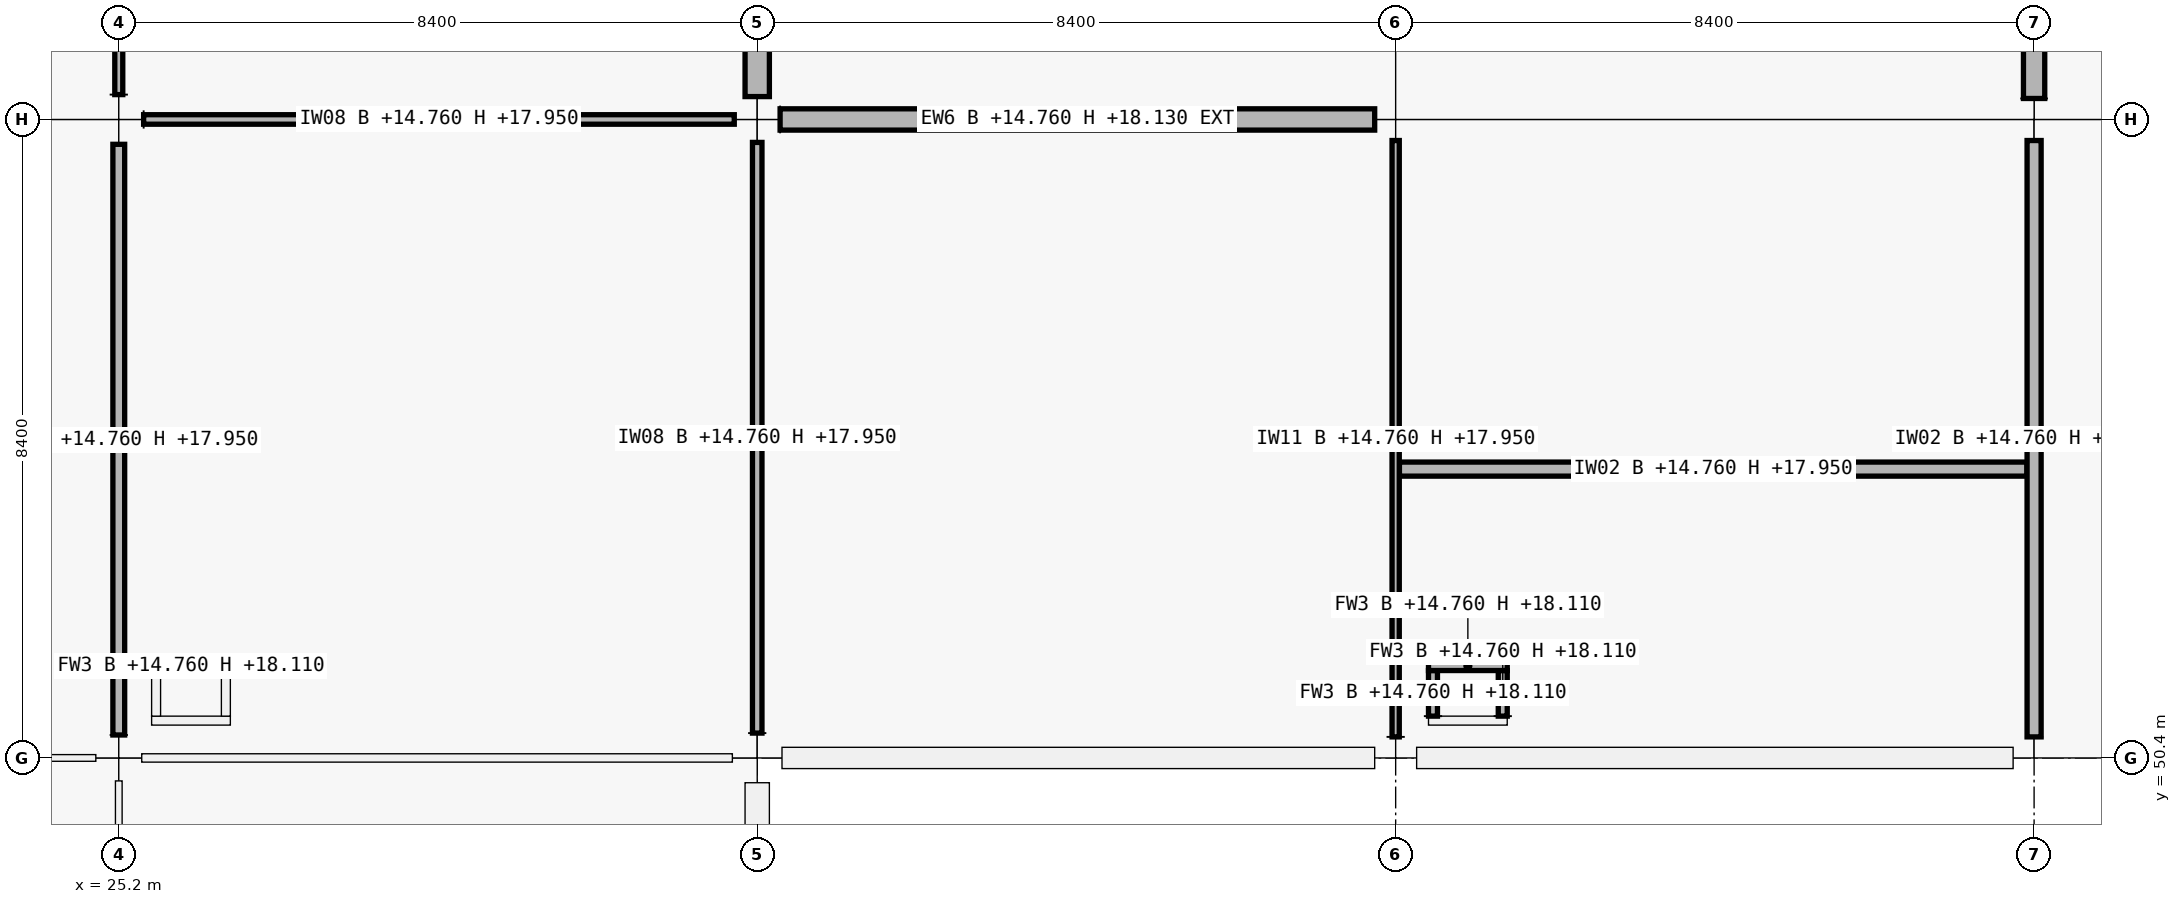
"""IFC4 building model, lengths in metres.
Left out: names, types, materials, properties, quantities, classifications, styles, units other than length and angle.
Written with IfcOpenShell. Run it as: python <this file> out.ifc"""

import sys

from ifc_helpers import new_model, si_unit, direction, frame, frame_2d, origin, origin_2d, place, context, subcontext, project, spatial, rectangle, extrude, element, fill, save


model = new_model("IFC4")
c1 = context("Model", 3, precision=1e-05, world=origin(), true_north=direction((0.0, 1.0)))
c2 = subcontext(c1, "Body", "Model", "MODEL_VIEW")
j1 = project(units=[si_unit("LENGTHUNIT", "METRE"), si_unit("PLANEANGLEUNIT", "RADIAN")], contexts=[c1])
p1 = place(None, origin())
s1 = spatial("IfcSite", under=j1, at=p1, CompositionType="ELEMENT")
p2 = place(p1, origin())
s2 = spatial("IfcBuilding", under=s1, at=p2, CompositionType="ELEMENT")
p3 = place(p2, frame((0.0, 0.0, 14.76)))
s3 = spatial("IfcBuildingStorey", under=s2, at=p3, CompositionType="ELEMENT", Elevation=14.76)
p4 = place(p3, frame((25.2, 50.4, 0.0), z_axis=(0.0, 0.0, 1.0), x_axis=(1.0, 0.0, 0.0)))
e1 = element("IfcColumn", 1, at=p4, inside=s3, PredefinedType="COLUMN", context=c2, shape_type="SweptSolid", body=[
    extrude(rectangle(XDim=0.6, YDim=0.6, at=origin_2d()), origin(), (0.0, 0.0, 1.0), 4.32),
])
for number, where, z_axis, x_axis in (
    (2, (25.2, 58.8, 0.0), (0.0, 0.0, 1.0), (1.0, 0.0, 0.0)),
    (3, (33.6, 50.4, 0.0), (0.0, 0.0, 1.0), (1.0, 0.0, 0.0)),
):
    element("IfcColumn", number, at=place(p3, frame(where, z_axis=z_axis, x_axis=x_axis)), inside=s3, PredefinedType="COLUMN", context=c2, shape_type="SweptSolid", body=[
        extrude(rectangle(XDim=0.65, YDim=0.65, at=origin_2d()), origin(), (0.0, 0.0, 1.0), 4.32),
    ])
p5 = place(p3, frame((33.6, 58.8, 0.0), z_axis=(0.0, 0.0, 1.0), x_axis=(1.0, 0.0, 0.0)))
e4 = element("IfcColumn", 4, at=p5, inside=s3, PredefinedType="COLUMN", context=c2, shape_type="SweptSolid", body=[
    extrude(rectangle(XDim=0.6, YDim=0.6, at=origin_2d()), origin(), (0.0, 0.0, 1.0), 4.32),
])
for number, where, z_axis, x_axis in (
    (5, (42.0, 50.4, 0.0), (0.0, 0.0, 1.0), (1.0, 0.0, 0.0)),
    (6, (42.0, 58.8, 0.0), (0.0, 0.0, 1.0), (1.0, 0.0, 0.0)),
    (7, (50.4, 50.4, 0.0), (0.0, 0.0, 1.0), (1.0, 0.0, 0.0)),
    (8, (50.4, 58.8, 0.0), (0.0, 0.0, 1.0), (1.0, 0.0, 0.0)),
):
    element("IfcColumn", number, at=place(p3, frame(where, z_axis=z_axis, x_axis=x_axis)), inside=s3, PredefinedType="COLUMN", context=c2, shape_type="SweptSolid", body=[
        extrude(rectangle(XDim=0.55, YDim=0.55, at=origin_2d()), origin(), (0.0, 0.0, 1.0), 4.07),
    ])
p6 = place(p3, frame((33.6, 50.074, 0.0), z_axis=(0.0, 0.0, 1.0), x_axis=(0.0, -1.0, 0.0)))
e9 = element("IfcWall", 9, at=p6, inside=s3, PredefinedType="SOLIDWALL", context=c2, shape_type="SweptSolid", body=[
    extrude(rectangle(XDim=7.773, YDim=0.32, at=frame_2d((3.886, 0.0))), origin(), (0.0, 0.0, 1.0), 3.37),
])
p7 = place(p6, frame((3.186, 0.0, 0.9)))
e10 = element("IfcOpeningElement", 10, at=p7, cuts=e9, PredefinedType="OPENING", context=c2, shape_type="SweptSolid", body=[
    extrude(rectangle(XDim=1.4, YDim=1.75, at=frame_2d((0.7, 0.875))), frame((0.0, 0.16, 0.0), z_axis=(0.0, -1.0, 0.0), x_axis=(1.0, 0.0, 0.0)), (0.0, 0.0, 1.0), 0.32),
])
p8 = place(p3, frame((33.6, 66.874, 0.0), z_axis=(0.0, 0.0, 1.0), x_axis=(0.0, -1.0, 0.0)))
e11 = element("IfcWall", 11, at=p8, inside=s3, PredefinedType="SOLIDWALL", context=c2, shape_type="SweptSolid", body=[
    extrude(rectangle(XDim=7.773, YDim=0.32, at=frame_2d((3.886, 0.0))), origin(), (0.0, 0.0, 1.0), 3.37),
])
p9 = place(p8, frame((2.286, 0.0, 0.9)))
e12 = element("IfcOpeningElement", 12, at=p9, cuts=e11, PredefinedType="OPENING", context=c2, shape_type="SweptSolid", body=[
    extrude(rectangle(XDim=3.2, YDim=1.75, at=frame_2d((1.6, 0.875))), frame((0.0, 0.16, 0.0), z_axis=(0.0, -1.0, 0.0), x_axis=(1.0, 0.0, 0.0)), (0.0, 0.0, 1.0), 0.32),
])
p10 = place(p3, frame((41.724, 50.4, 0.0), z_axis=(0.0, 0.0, 1.0), x_axis=(-1.0, 0.0, 0.0)))
e13 = element("IfcWall", 13, at=p10, inside=s3, PredefinedType="SOLIDWALL", context=c2, shape_type="SweptSolid", body=[
    extrude(rectangle(XDim=7.798, YDim=0.28, at=frame_2d((3.899, 0.0))), origin(), (0.0, 0.0, 1.0), 3.37),
])
p11 = place(p3, frame((33.901, 58.8, 0.0), z_axis=(0.0, 0.0, 1.0), x_axis=(1.0, 0.0, 0.0)))
e14 = element("IfcWall", 14, at=p11, inside=s3, PredefinedType="SOLIDWALL", context=c2, shape_type="SweptSolid", body=[
    extrude(rectangle(XDim=7.823, YDim=0.28, at=frame_2d((3.912, 0.0))), origin(), (0.0, 0.0, 1.0), 3.37),
])
p12 = place(p3, frame((50.124, 50.4, 0.0), z_axis=(0.0, 0.0, 1.0), x_axis=(-1.0, 0.0, 0.0)))
e15 = element("IfcWall", 15, at=p12, inside=s3, PredefinedType="SOLIDWALL", context=c2, shape_type="SweptSolid", body=[
    extrude(rectangle(XDim=7.848, YDim=0.28, at=frame_2d((3.924, 0.0))), origin(), (0.0, 0.0, 1.0), 3.37),
])
p13 = place(p12, frame((3.374, 0.0, 0.9)))
e16 = element("IfcOpeningElement", 16, at=p13, cuts=e15, PredefinedType="OPENING", context=c2, shape_type="SweptSolid", body=[
    extrude(rectangle(XDim=1.1, YDim=1.5, at=frame_2d((0.55, 0.75))), frame((0.0, 0.14, 0.0), z_axis=(0.0, -1.0, 0.0), x_axis=(1.0, 0.0, 0.0)), (0.0, 0.0, 1.0), 0.28),
])
p14 = place(p3, frame((50.4, 59.076, 0.0), z_axis=(0.0, 0.0, 1.0), x_axis=(0.0, 1.0, 0.0)))
e17 = element("IfcWall", 17, at=p14, inside=s3, PredefinedType="SOLIDWALL", context=c2, shape_type="SweptSolid", body=[
    extrude(rectangle(XDim=7.798, YDim=0.28, at=frame_2d((3.899, 0.0))), origin(), (0.0, 0.0, 1.0), 3.37),
])
p15 = place(p14, frame((3.149, 0.0, 0.9)))
e18 = element("IfcOpeningElement", 18, at=p15, cuts=e17, PredefinedType="OPENING", context=c2, shape_type="SweptSolid", body=[
    extrude(rectangle(XDim=1.5, YDim=1.2, at=frame_2d((0.75, 0.6))), frame((0.0, 0.14, 0.0), z_axis=(0.0, -1.0, 0.0), x_axis=(1.0, 0.0, 0.0)), (0.0, 0.0, 1.0), 0.28),
])
for number, where, z_axis, x_axis in (
    (19, (25.632, 50.891, 0.0), (0.0, 0.0, 1.0), (1.0, 0.0, 0.0)),
    (20, (25.632, 51.609, 0.0), (0.0, 0.0, 1.0), (1.0, 0.0, 0.0)),
):
    element("IfcWall", number, at=place(p3, frame(where, z_axis=z_axis, x_axis=x_axis)), inside=s3, PredefinedType="PARTITIONING", context=c2, shape_type="SweptSolid", body=[
        extrude(rectangle(XDim=1.036, YDim=0.118, at=frame_2d((0.518, 0.0))), origin(), (0.0, 0.0, 1.0), 3.35),
    ])
for number, where, z_axis, x_axis in (
    (21, (25.691, 50.95, 0.0), (0.0, 0.0, 1.0), (0.0, 1.0, 0.0)),
    (22, (26.609, 50.95, 0.0), (0.0, 0.0, 1.0), (0.0, 1.0, 0.0)),
):
    element("IfcWall", number, at=place(p3, frame(where, z_axis=z_axis, x_axis=x_axis)), inside=s3, PredefinedType="PARTITIONING", context=c2, shape_type="SweptSolid", body=[
        extrude(rectangle(XDim=0.6, YDim=0.118, at=frame_2d((0.3, 0.0))), origin(), (0.0, 0.0, 1.0), 3.35),
    ])
for number, where, z_axis, x_axis in (
    (23, (42.432, 50.891, 0.0), (0.0, 0.0, 1.0), (1.0, 0.0, 0.0)),
    (24, (42.432, 51.609, 0.0), (0.0, 0.0, 1.0), (1.0, 0.0, 0.0)),
):
    element("IfcWall", number, at=place(p3, frame(where, z_axis=z_axis, x_axis=x_axis)), inside=s3, PredefinedType="PARTITIONING", context=c2, shape_type="SweptSolid", body=[
        extrude(rectangle(XDim=1.036, YDim=0.118, at=frame_2d((0.518, 0.0))), origin(), (0.0, 0.0, 1.0), 3.35),
    ])
for number, where, z_axis, x_axis in (
    (25, (42.491, 50.95, 0.0), (0.0, 0.0, 1.0), (0.0, 1.0, 0.0)),
    (26, (43.409, 50.95, 0.0), (0.0, 0.0, 1.0), (0.0, 1.0, 0.0)),
):
    element("IfcWall", number, at=place(p3, frame(where, z_axis=z_axis, x_axis=x_axis)), inside=s3, PredefinedType="PARTITIONING", context=c2, shape_type="SweptSolid", body=[
        extrude(rectangle(XDim=0.6, YDim=0.118, at=frame_2d((0.3, 0.0))), origin(), (0.0, 0.0, 1.0), 3.35),
    ])
p16 = place(p3, frame((17.127, 50.4, 0.0), z_axis=(0.0, 0.0, 1.0), x_axis=(1.0, 0.0, 0.0)))
e27 = element("IfcWall", 27, at=p16, inside=s3, PredefinedType="PARTITIONING", context=c2, shape_type="SweptSolid", body=[
    extrude(rectangle(XDim=7.771, YDim=0.088, at=frame_2d((3.885, 0.0))), origin(), (0.0, 0.0, 1.0), 3.19),
])
p17 = place(p16, frame((0.658, 0.0, 0.0)))
e28 = element("IfcOpeningElement", 28, at=p17, cuts=e27, PredefinedType="OPENING", context=c2, shape_type="SweptSolid", body=[
    extrude(rectangle(XDim=0.96, YDim=2.1, at=frame_2d((0.48, 1.05))), frame((0.0, 0.044, 0.0), z_axis=(0.0, -1.0, 0.0), x_axis=(1.0, 0.0, 0.0)), (0.0, 0.0, 1.0), 0.088),
])
p18 = place(p16, frame((4.598, 0.0, 0.0)))
e29 = element("IfcOpeningElement", 29, at=p18, cuts=e27, PredefinedType="OPENING", context=c2, shape_type="SweptSolid", body=[
    extrude(rectangle(XDim=0.92, YDim=2.1, at=frame_2d((0.46, 1.05))), frame((0.0, 0.044, 0.0), z_axis=(0.0, -1.0, 0.0), x_axis=(1.0, 0.0, 0.0)), (0.0, 0.0, 1.0), 0.088),
])
p19 = place(p3, frame((25.502, 50.4, 0.0), z_axis=(0.0, 0.0, 1.0), x_axis=(1.0, 0.0, 0.0)))
e30 = element("IfcWall", 30, at=p19, inside=s3, PredefinedType="MOVABLE", context=c2, shape_type="SweptSolid", body=[
    extrude(rectangle(XDim=7.771, YDim=0.11, at=frame_2d((3.885, 0.0))), origin(), (0.0, 0.0, 1.0), 3.19),
])
p20 = place(p19, frame((3.381, 0.0, 0.0)))
e31 = element("IfcOpeningElement", 31, at=p20, cuts=e30, PredefinedType="OPENING", context=c2, shape_type="SweptSolid", body=[
    extrude(rectangle(XDim=1.01, YDim=2.12, at=frame_2d((0.505, 1.06))), frame((0.0, 0.055, 0.0), z_axis=(0.0, -1.0, 0.0), x_axis=(1.0, 0.0, 0.0)), (0.0, 0.0, 1.0), 0.11),
])
p21 = place(p3, frame((25.527, 58.8, 0.0), z_axis=(0.0, 0.0, 1.0), x_axis=(1.0, 0.0, 0.0)))
e32 = element("IfcWall", 32, at=p21, inside=s3, PredefinedType="PARTITIONING", context=c2, shape_type="SweptSolid", body=[
    extrude(rectangle(XDim=7.771, YDim=0.125, at=frame_2d((3.885, 0.0))), origin(), (0.0, 0.0, 1.0), 3.19),
])
p22 = place(p21, frame((3.401, 0.0, 0.0)))
e33 = element("IfcOpeningElement", 33, at=p22, cuts=e32, PredefinedType="OPENING", context=c2, shape_type="SweptSolid", body=[
    extrude(rectangle(XDim=0.97, YDim=2.12, at=frame_2d((0.485, 1.06))), frame((0.0, 0.062, 0.0), z_axis=(0.0, -1.0, 0.0), x_axis=(1.0, 0.0, 0.0)), (0.0, 0.0, 1.0), 0.125),
])
p23 = place(p3, frame((25.2, 42.327, 0.0), z_axis=(0.0, 0.0, 1.0), x_axis=(0.0, 1.0, 0.0)))
e34 = element("IfcWall", 34, at=p23, inside=s3, PredefinedType="PARTITIONING", context=c2, shape_type="SweptSolid", body=[
    extrude(rectangle(XDim=7.771, YDim=0.088, at=frame_2d((3.885, 0.0))), origin(), (0.0, 0.0, 1.0), 3.19),
])
p24 = place(p3, frame((25.2, 50.702, 0.0), z_axis=(0.0, 0.0, 1.0), x_axis=(0.0, 1.0, 0.0)))
e35 = element("IfcWall", 35, at=p24, inside=s3, PredefinedType="PARTITIONING", context=c2, shape_type="SweptSolid", body=[
    extrude(rectangle(XDim=7.771, YDim=0.155, at=frame_2d((3.885, 0.0))), origin(), (0.0, 0.0, 1.0), 3.19),
])
p25 = place(p24, frame((3.385, 0.0, 0.0)))
e36 = element("IfcOpeningElement", 36, at=p25, cuts=e35, PredefinedType="OPENING", context=c2, shape_type="SweptSolid", body=[
    extrude(rectangle(XDim=1.0, YDim=2.2, at=frame_2d((0.5, 1.1))), frame((0.0, 0.078, 0.0), z_axis=(0.0, -1.0, 0.0), x_axis=(1.0, 0.0, 0.0)), (0.0, 0.0, 1.0), 0.155),
])
p26 = place(p3, frame((25.2, 59.127, 0.0), z_axis=(0.0, 0.0, 1.0), x_axis=(0.0, 1.0, 0.0)))
e37 = element("IfcWall", 37, at=p26, inside=s3, PredefinedType="PARTITIONING", context=c2, shape_type="SweptSolid", body=[
    extrude(rectangle(XDim=7.771, YDim=0.105, at=frame_2d((3.885, 0.0))), origin(), (0.0, 0.0, 1.0), 3.19),
])
p27 = place(p26, frame((3.396, 0.0, 0.0)))
e38 = element("IfcOpeningElement", 38, at=p27, cuts=e37, PredefinedType="OPENING", context=c2, shape_type="SweptSolid", body=[
    extrude(rectangle(XDim=0.98, YDim=2.18, at=frame_2d((0.49, 1.09))), frame((0.0, 0.052, 0.0), z_axis=(0.0, -1.0, 0.0), x_axis=(1.0, 0.0, 0.0)), (0.0, 0.0, 1.0), 0.105),
])
p28 = place(p3, frame((33.6, 50.727, 0.0), z_axis=(0.0, 0.0, 1.0), x_axis=(0.0, 1.0, 0.0)))
e39 = element("IfcWall", 39, at=p28, inside=s3, PredefinedType="PARTITIONING", context=c2, shape_type="SweptSolid", body=[
    extrude(rectangle(XDim=7.771, YDim=0.125, at=frame_2d((3.885, 0.0))), origin(), (0.0, 0.0, 1.0), 3.19),
])
p29 = place(p28, frame((3.365, 0.0, 0.0)))
e40 = element("IfcOpeningElement", 40, at=p29, cuts=e39, PredefinedType="OPENING", context=c2, shape_type="SweptSolid", body=[
    extrude(rectangle(XDim=1.04, YDim=2.2, at=frame_2d((0.52, 1.1))), frame((0.0, 0.062, 0.0), z_axis=(0.0, -1.0, 0.0), x_axis=(1.0, 0.0, 0.0)), (0.0, 0.0, 1.0), 0.125),
])
p30 = place(p3, frame((42.0, 50.677, 0.0), z_axis=(0.0, 0.0, 1.0), x_axis=(0.0, 1.0, 0.0)))
e41 = element("IfcWall", 41, at=p30, inside=s3, PredefinedType="PARTITIONING", context=c2, shape_type="SweptSolid", body=[
    extrude(rectangle(XDim=7.846, YDim=0.095, at=frame_2d((3.923, 0.0))), origin(), (0.0, 0.0, 1.0), 3.19),
])
p31 = place(p3, frame((50.4, 50.677, 0.0), z_axis=(0.0, 0.0, 1.0), x_axis=(0.0, 1.0, 0.0)))
e42 = element("IfcWall", 42, at=p31, inside=s3, PredefinedType="PARTITIONING", context=c2, shape_type="SweptSolid", body=[
    extrude(rectangle(XDim=7.846, YDim=0.185, at=frame_2d((3.923, 0.0))), origin(), (0.0, 0.0, 1.0), 3.19),
])
p32 = place(p31, frame((1.273, 0.0, 0.0)))
e43 = element("IfcOpeningElement", 43, at=p32, cuts=e42, PredefinedType="OPENING", context=c2, shape_type="SweptSolid", body=[
    extrude(rectangle(XDim=0.98, YDim=2.18, at=frame_2d((0.49, 1.09))), frame((0.0, 0.093, 0.0), z_axis=(0.0, -1.0, 0.0), x_axis=(1.0, 0.0, 0.0)), (0.0, 0.0, 1.0), 0.185),
])
p33 = place(p31, frame((5.203, 0.0, 0.0)))
e44 = element("IfcOpeningElement", 44, at=p33, cuts=e42, PredefinedType="OPENING", context=c2, shape_type="SweptSolid", body=[
    extrude(rectangle(XDim=0.96, YDim=2.18, at=frame_2d((0.48, 1.09))), frame((0.0, 0.093, 0.0), z_axis=(0.0, -1.0, 0.0), x_axis=(1.0, 0.0, 0.0)), (0.0, 0.0, 1.0), 0.185),
])
p34 = place(p3, frame((42.05, 54.2, 0.0), z_axis=(0.0, 0.0, 1.0), x_axis=(1.0, 0.0, 0.0)))
e45 = element("IfcWall", 45, at=p34, inside=s3, PredefinedType="PARTITIONING", context=c2, shape_type="SweptSolid", body=[
    extrude(rectangle(XDim=8.256, YDim=0.185, at=frame_2d((4.128, 0.0))), origin(), (0.0, 0.0, 1.0), 3.19),
])
p35 = place(p13, origin())
e46 = element("IfcWindow", 46, at=p35, inside=s3, PartitioningType="SINGLE_PANEL", PredefinedType="WINDOW", context=c2, shape_type="SweptSolid", body=[
    extrude(rectangle(XDim=1.1, YDim=1.5, at=frame_2d((0.55, 0.75))), frame((0.0, 0.03, 0.0), z_axis=(0.0, -1.0, 0.0), x_axis=(1.0, 0.0, 0.0)), (0.0, 0.0, 1.0), 0.06),
])
fill(e16, e46)
p36 = place(p32, origin())
e47 = element("IfcDoor", 47, at=p36, inside=s3, OperationType="SINGLE_SWING_RIGHT", PredefinedType="DOOR", context=c2, shape_type="SweptSolid", body=[
    extrude(rectangle(XDim=0.98, YDim=2.18, at=frame_2d((0.49, 1.09))), frame((0.0, 0.025, 0.0), z_axis=(0.0, -1.0, 0.0), x_axis=(1.0, 0.0, 0.0)), (0.0, 0.0, 1.0), 0.05),
])
fill(e43, e47)
p37 = place(p33, origin())
e48 = element("IfcDoor", 48, at=p37, inside=s3, OperationType="SINGLE_SWING_LEFT", PredefinedType="DOOR", context=c2, shape_type="SweptSolid", body=[
    extrude(rectangle(XDim=0.96, YDim=2.18, at=frame_2d((0.48, 1.09))), frame((0.0, 0.025, 0.0), z_axis=(0.0, -1.0, 0.0), x_axis=(1.0, 0.0, 0.0)), (0.0, 0.0, 1.0), 0.05),
])
fill(e44, e48)
p38 = place(p25, origin())
e49 = element("IfcDoor", 49, at=p38, inside=s3, OperationType="SINGLE_SWING_LEFT", PredefinedType="DOOR", context=c2, shape_type="SweptSolid", body=[
    extrude(rectangle(XDim=1.0, YDim=2.2, at=frame_2d((0.5, 1.1))), frame((0.0, 0.025, 0.0), z_axis=(0.0, -1.0, 0.0), x_axis=(1.0, 0.0, 0.0)), (0.0, 0.0, 1.0), 0.05),
])
fill(e36, e49)
p39 = place(p29, origin())
e50 = element("IfcDoor", 50, at=p39, inside=s3, OperationType="SINGLE_SWING_RIGHT", PredefinedType="DOOR", context=c2, shape_type="SweptSolid", body=[
    extrude(rectangle(XDim=1.04, YDim=2.2, at=frame_2d((0.52, 1.1))), frame((0.0, 0.025, 0.0), z_axis=(0.0, -1.0, 0.0), x_axis=(1.0, 0.0, 0.0)), (0.0, 0.0, 1.0), 0.05),
])
fill(e40, e50)
p40 = place(p20, origin())
e51 = element("IfcDoor", 51, at=p40, inside=s3, OperationType="SINGLE_SWING_RIGHT", PredefinedType="DOOR", context=c2, shape_type="SweptSolid", body=[
    extrude(rectangle(XDim=1.01, YDim=2.12, at=frame_2d((0.505, 1.06))), frame((0.0, 0.025, 0.0), z_axis=(0.0, -1.0, 0.0), x_axis=(1.0, 0.0, 0.0)), (0.0, 0.0, 1.0), 0.05),
])
fill(e31, e51)
p41 = place(p22, origin())
e52 = element("IfcDoor", 52, at=p41, inside=s3, OperationType="SINGLE_SWING_LEFT", PredefinedType="DOOR", context=c2, shape_type="SweptSolid", body=[
    extrude(rectangle(XDim=0.97, YDim=2.12, at=frame_2d((0.485, 1.06))), frame((0.0, 0.025, 0.0), z_axis=(0.0, -1.0, 0.0), x_axis=(1.0, 0.0, 0.0)), (0.0, 0.0, 1.0), 0.05),
])
fill(e33, e52)
save(model, sys.argv[1])
